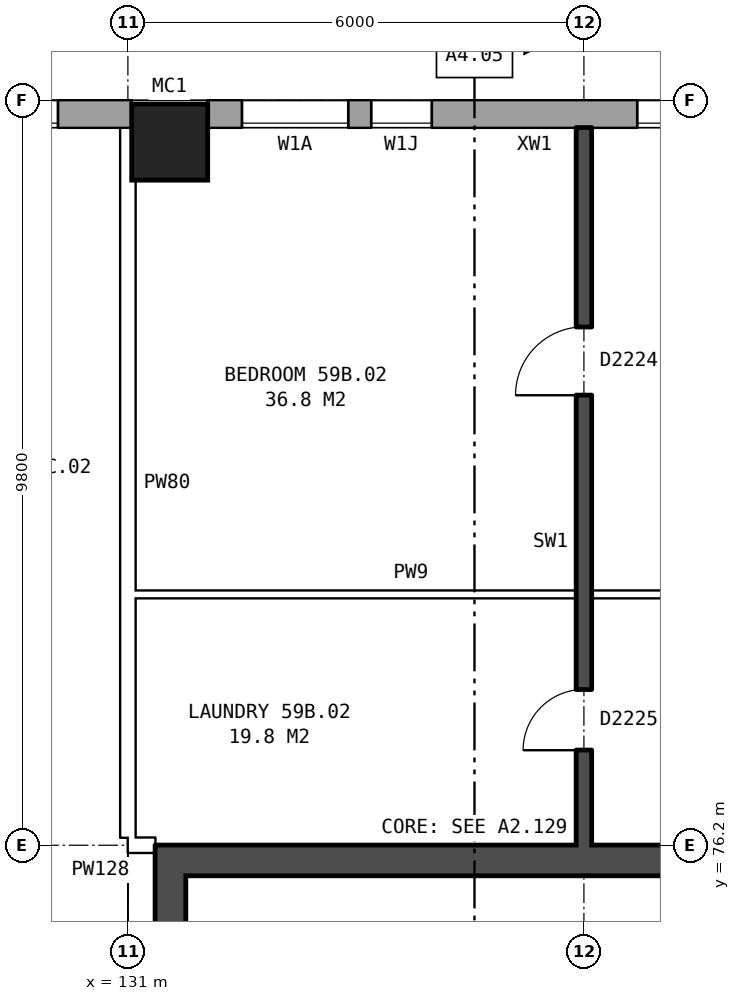
"""IFC4 building model, lengths in metres.
Left out: names, types, materials, properties, quantities, classifications, styles, units other than length and angle.
Written with IfcOpenShell. Run it as: python <this file> out.ifc"""

import sys

from ifc_helpers import new_model, si_unit, direction, frame, frame_2d, origin, origin_2d, place, context, subcontext, project, spatial, rectangle, hollow_rectangle, extrude, element, fill, save


model = new_model("IFC4")
c1 = context("Model", 3, precision=1e-05, world=origin(), true_north=direction((0.0, 1.0)))
c2 = subcontext(c1, "Body", "Model", "MODEL_VIEW")
j1 = project(units=[si_unit("LENGTHUNIT", "METRE"), si_unit("PLANEANGLEUNIT", "RADIAN")], contexts=[c1])
p1 = place(None, origin())
s1 = spatial("IfcSite", under=j1, at=p1, CompositionType="ELEMENT")
p2 = place(p1, origin())
s2 = spatial("IfcBuilding", under=s1, at=p2, CompositionType="ELEMENT")
p3 = place(p2, frame((0.0, 0.0, 209.0)))
s3 = spatial("IfcBuildingStorey", under=s2, at=p3, CompositionType="ELEMENT", Elevation=209.0)
p4 = place(p3, frame((131.55, 85.45, 0.0), z_axis=(0.0, 0.0, 1.0), x_axis=(1.0, 0.0, 0.0)))
e1 = element("IfcColumn", 1, at=p4, inside=s3, PredefinedType="COLUMN", context=c2, shape_type="SweptSolid", body=[
    extrude(hollow_rectangle(XDim=1.0, YDim=1.0, WallThickness=0.055, at=origin_2d()), origin(), (0.0, 0.0, 1.0), 3.1),
])
p5 = place(p3, frame((165.925, 85.82, 0.0), z_axis=(0.0, 0.0, 1.0), x_axis=(-1.0, 0.0, 0.0)))
e2 = element("IfcWall", 2, at=p5, inside=s3, PredefinedType="STANDARD", context=c2, shape_type="SweptSolid", body=[
    extrude(rectangle(XDim=33.875, YDim=0.36, at=frame_2d((16.938, 0.0))), origin(), (0.0, 0.0, 1.0), 2.85),
])
p6 = place(p5, frame((2.625, 0.0, 0.8)))
e3 = element("IfcOpeningElement", 3, at=p6, cuts=e2, PredefinedType="OPENING", context=c2, shape_type="SweptSolid", body=[
    extrude(rectangle(XDim=1.6, YDim=1.8, at=frame_2d((0.8, 0.9))), frame((0.0, 0.19, 0.0), z_axis=(0.0, -1.0, 0.0), x_axis=(1.0, 0.0, 0.0)), (0.0, 0.0, 1.0), 0.38),
])
p7 = place(p5, frame((5.625, 0.0, 0.8)))
e4 = element("IfcOpeningElement", 4, at=p7, cuts=e2, PredefinedType="OPENING", context=c2, shape_type="SweptSolid", body=[
    extrude(rectangle(XDim=1.6, YDim=1.8, at=frame_2d((0.8, 0.9))), frame((0.0, 0.19, 0.0), z_axis=(0.0, -1.0, 0.0), x_axis=(1.0, 0.0, 0.0)), (0.0, 0.0, 1.0), 0.38),
])
p8 = place(p5, frame((8.625, 0.0, 0.8)))
e5 = element("IfcOpeningElement", 5, at=p8, cuts=e2, PredefinedType="OPENING", context=c2, shape_type="SweptSolid", body=[
    extrude(rectangle(XDim=1.6, YDim=1.8, at=frame_2d((0.8, 0.9))), frame((0.0, 0.19, 0.0), z_axis=(0.0, -1.0, 0.0), x_axis=(1.0, 0.0, 0.0)), (0.0, 0.0, 1.0), 0.38),
])
p9 = place(p5, frame((11.625, 0.0, 0.8)))
e6 = element("IfcOpeningElement", 6, at=p9, cuts=e2, PredefinedType="OPENING", context=c2, shape_type="SweptSolid", body=[
    extrude(rectangle(XDim=1.6, YDim=1.8, at=frame_2d((0.8, 0.9))), frame((0.0, 0.19, 0.0), z_axis=(0.0, -1.0, 0.0), x_axis=(1.0, 0.0, 0.0)), (0.0, 0.0, 1.0), 0.38),
])
p10 = place(p5, frame((14.625, 0.0, 0.8)))
e7 = element("IfcOpeningElement", 7, at=p10, cuts=e2, PredefinedType="OPENING", context=c2, shape_type="SweptSolid", body=[
    extrude(rectangle(XDim=1.6, YDim=1.8, at=frame_2d((0.8, 0.9))), frame((0.0, 0.19, 0.0), z_axis=(0.0, -1.0, 0.0), x_axis=(1.0, 0.0, 0.0)), (0.0, 0.0, 1.0), 0.38),
])
p11 = place(p5, frame((17.625, 0.0, 0.8)))
e8 = element("IfcOpeningElement", 8, at=p11, cuts=e2, PredefinedType="OPENING", context=c2, shape_type="SweptSolid", body=[
    extrude(rectangle(XDim=1.6, YDim=1.8, at=frame_2d((0.8, 0.9))), frame((0.0, 0.19, 0.0), z_axis=(0.0, -1.0, 0.0), x_axis=(1.0, 0.0, 0.0)), (0.0, 0.0, 1.0), 0.38),
])
p12 = place(p5, frame((20.625, 0.0, 0.8)))
e9 = element("IfcOpeningElement", 9, at=p12, cuts=e2, PredefinedType="OPENING", context=c2, shape_type="SweptSolid", body=[
    extrude(rectangle(XDim=1.6, YDim=1.8, at=frame_2d((0.8, 0.9))), frame((0.0, 0.19, 0.0), z_axis=(0.0, -1.0, 0.0), x_axis=(1.0, 0.0, 0.0)), (0.0, 0.0, 1.0), 0.38),
])
p13 = place(p5, frame((23.625, 0.0, 0.8)))
e10 = element("IfcOpeningElement", 10, at=p13, cuts=e2, PredefinedType="OPENING", context=c2, shape_type="SweptSolid", body=[
    extrude(rectangle(XDim=1.6, YDim=1.8, at=frame_2d((0.8, 0.9))), frame((0.0, 0.19, 0.0), z_axis=(0.0, -1.0, 0.0), x_axis=(1.0, 0.0, 0.0)), (0.0, 0.0, 1.0), 0.38),
])
p14 = place(p5, frame((26.625, 0.0, 0.8)))
e11 = element("IfcOpeningElement", 11, at=p14, cuts=e2, PredefinedType="OPENING", context=c2, shape_type="SweptSolid", body=[
    extrude(rectangle(XDim=1.6, YDim=1.8, at=frame_2d((0.8, 0.9))), frame((0.0, 0.19, 0.0), z_axis=(0.0, -1.0, 0.0), x_axis=(1.0, 0.0, 0.0)), (0.0, 0.0, 1.0), 0.38),
])
p15 = place(p5, frame((30.925, 0.0, 1.1)))
e12 = element("IfcOpeningElement", 12, at=p15, cuts=e2, PredefinedType="OPENING", context=c2, shape_type="SweptSolid", body=[
    extrude(rectangle(XDim=0.8, YDim=1.5, at=frame_2d((0.4, 0.75))), frame((0.0, 0.19, 0.0), z_axis=(0.0, -1.0, 0.0), x_axis=(1.0, 0.0, 0.0)), (0.0, 0.0, 1.0), 0.38),
])
p16 = place(p5, frame((32.025, 0.0, 0.8)))
e13 = element("IfcOpeningElement", 13, at=p16, cuts=e2, PredefinedType="OPENING", context=c2, shape_type="SweptSolid", body=[
    extrude(rectangle(XDim=1.4, YDim=1.8, at=frame_2d((0.7, 0.9))), frame((0.0, 0.19, 0.0), z_axis=(0.0, -1.0, 0.0), x_axis=(1.0, 0.0, 0.0)), (0.0, 0.0, 1.0), 0.38),
])
p17 = place(p3, frame((131.05, 85.82, 0.0), z_axis=(0.0, 0.0, 1.0), x_axis=(-1.0, 0.0, 0.0)))
e14 = element("IfcWall", 14, at=p17, inside=s3, PredefinedType="STANDARD", context=c2, shape_type="SweptSolid", body=[
    extrude(rectangle(XDim=55.1, YDim=0.36, at=frame_2d((27.55, 0.0))), origin(), (0.0, 0.0, 1.0), 2.85),
])
p18 = place(p17, frame((0.969, 0.0, 0.8)))
e15 = element("IfcOpeningElement", 15, at=p18, cuts=e14, PredefinedType="OPENING", context=c2, shape_type="SweptSolid", body=[
    extrude(rectangle(XDim=1.6, YDim=1.8, at=frame_2d((0.8, 0.9))), frame((0.0, 0.19, 0.0), z_axis=(0.0, -1.0, 0.0), x_axis=(1.0, 0.0, 0.0)), (0.0, 0.0, 1.0), 0.38),
])
p19 = place(p17, frame((4.406, 0.0, 0.8)))
e16 = element("IfcOpeningElement", 16, at=p19, cuts=e14, PredefinedType="OPENING", context=c2, shape_type="SweptSolid", body=[
    extrude(rectangle(XDim=1.6, YDim=1.8, at=frame_2d((0.8, 0.9))), frame((0.0, 0.19, 0.0), z_axis=(0.0, -1.0, 0.0), x_axis=(1.0, 0.0, 0.0)), (0.0, 0.0, 1.0), 0.38),
])
p20 = place(p17, frame((7.844, 0.0, 0.8)))
e17 = element("IfcOpeningElement", 17, at=p20, cuts=e14, PredefinedType="OPENING", context=c2, shape_type="SweptSolid", body=[
    extrude(rectangle(XDim=1.6, YDim=1.8, at=frame_2d((0.8, 0.9))), frame((0.0, 0.19, 0.0), z_axis=(0.0, -1.0, 0.0), x_axis=(1.0, 0.0, 0.0)), (0.0, 0.0, 1.0), 0.38),
])
p21 = place(p17, frame((11.281, 0.0, 0.8)))
e18 = element("IfcOpeningElement", 18, at=p21, cuts=e14, PredefinedType="OPENING", context=c2, shape_type="SweptSolid", body=[
    extrude(rectangle(XDim=1.6, YDim=1.8, at=frame_2d((0.8, 0.9))), frame((0.0, 0.19, 0.0), z_axis=(0.0, -1.0, 0.0), x_axis=(1.0, 0.0, 0.0)), (0.0, 0.0, 1.0), 0.38),
])
p22 = place(p17, frame((14.719, 0.0, 0.8)))
e19 = element("IfcOpeningElement", 19, at=p22, cuts=e14, PredefinedType="OPENING", context=c2, shape_type="SweptSolid", body=[
    extrude(rectangle(XDim=1.6, YDim=1.8, at=frame_2d((0.8, 0.9))), frame((0.0, 0.19, 0.0), z_axis=(0.0, -1.0, 0.0), x_axis=(1.0, 0.0, 0.0)), (0.0, 0.0, 1.0), 0.38),
])
p23 = place(p17, frame((18.156, 0.0, 0.8)))
e20 = element("IfcOpeningElement", 20, at=p23, cuts=e14, PredefinedType="OPENING", context=c2, shape_type="SweptSolid", body=[
    extrude(rectangle(XDim=1.6, YDim=1.8, at=frame_2d((0.8, 0.9))), frame((0.0, 0.19, 0.0), z_axis=(0.0, -1.0, 0.0), x_axis=(1.0, 0.0, 0.0)), (0.0, 0.0, 1.0), 0.38),
])
p24 = place(p17, frame((21.594, 0.0, 0.8)))
e21 = element("IfcOpeningElement", 21, at=p24, cuts=e14, PredefinedType="OPENING", context=c2, shape_type="SweptSolid", body=[
    extrude(rectangle(XDim=1.6, YDim=1.8, at=frame_2d((0.8, 0.9))), frame((0.0, 0.19, 0.0), z_axis=(0.0, -1.0, 0.0), x_axis=(1.0, 0.0, 0.0)), (0.0, 0.0, 1.0), 0.38),
])
p25 = place(p17, frame((25.031, 0.0, 0.8)))
e22 = element("IfcOpeningElement", 22, at=p25, cuts=e14, PredefinedType="OPENING", context=c2, shape_type="SweptSolid", body=[
    extrude(rectangle(XDim=1.6, YDim=1.8, at=frame_2d((0.8, 0.9))), frame((0.0, 0.19, 0.0), z_axis=(0.0, -1.0, 0.0), x_axis=(1.0, 0.0, 0.0)), (0.0, 0.0, 1.0), 0.38),
])
p26 = place(p17, frame((28.469, 0.0, 0.8)))
e23 = element("IfcOpeningElement", 23, at=p26, cuts=e14, PredefinedType="OPENING", context=c2, shape_type="SweptSolid", body=[
    extrude(rectangle(XDim=1.6, YDim=1.8, at=frame_2d((0.8, 0.9))), frame((0.0, 0.19, 0.0), z_axis=(0.0, -1.0, 0.0), x_axis=(1.0, 0.0, 0.0)), (0.0, 0.0, 1.0), 0.38),
])
p27 = place(p17, frame((31.906, 0.0, 0.8)))
e24 = element("IfcOpeningElement", 24, at=p27, cuts=e14, PredefinedType="OPENING", context=c2, shape_type="SweptSolid", body=[
    extrude(rectangle(XDim=1.6, YDim=1.8, at=frame_2d((0.8, 0.9))), frame((0.0, 0.19, 0.0), z_axis=(0.0, -1.0, 0.0), x_axis=(1.0, 0.0, 0.0)), (0.0, 0.0, 1.0), 0.38),
])
p28 = place(p17, frame((35.344, 0.0, 0.8)))
e25 = element("IfcOpeningElement", 25, at=p28, cuts=e14, PredefinedType="OPENING", context=c2, shape_type="SweptSolid", body=[
    extrude(rectangle(XDim=1.6, YDim=1.8, at=frame_2d((0.8, 0.9))), frame((0.0, 0.19, 0.0), z_axis=(0.0, -1.0, 0.0), x_axis=(1.0, 0.0, 0.0)), (0.0, 0.0, 1.0), 0.38),
])
p29 = place(p17, frame((38.781, 0.0, 0.8)))
e26 = element("IfcOpeningElement", 26, at=p29, cuts=e14, PredefinedType="OPENING", context=c2, shape_type="SweptSolid", body=[
    extrude(rectangle(XDim=1.6, YDim=1.8, at=frame_2d((0.8, 0.9))), frame((0.0, 0.19, 0.0), z_axis=(0.0, -1.0, 0.0), x_axis=(1.0, 0.0, 0.0)), (0.0, 0.0, 1.0), 0.38),
])
p30 = place(p17, frame((42.219, 0.0, 0.8)))
e27 = element("IfcOpeningElement", 27, at=p30, cuts=e14, PredefinedType="OPENING", context=c2, shape_type="SweptSolid", body=[
    extrude(rectangle(XDim=1.6, YDim=1.8, at=frame_2d((0.8, 0.9))), frame((0.0, 0.19, 0.0), z_axis=(0.0, -1.0, 0.0), x_axis=(1.0, 0.0, 0.0)), (0.0, 0.0, 1.0), 0.38),
])
p31 = place(p17, frame((45.656, 0.0, 0.8)))
e28 = element("IfcOpeningElement", 28, at=p31, cuts=e14, PredefinedType="OPENING", context=c2, shape_type="SweptSolid", body=[
    extrude(rectangle(XDim=1.6, YDim=1.8, at=frame_2d((0.8, 0.9))), frame((0.0, 0.19, 0.0), z_axis=(0.0, -1.0, 0.0), x_axis=(1.0, 0.0, 0.0)), (0.0, 0.0, 1.0), 0.38),
])
p32 = place(p17, frame((49.094, 0.0, 0.8)))
e29 = element("IfcOpeningElement", 29, at=p32, cuts=e14, PredefinedType="OPENING", context=c2, shape_type="SweptSolid", body=[
    extrude(rectangle(XDim=1.6, YDim=1.8, at=frame_2d((0.8, 0.9))), frame((0.0, 0.19, 0.0), z_axis=(0.0, -1.0, 0.0), x_axis=(1.0, 0.0, 0.0)), (0.0, 0.0, 1.0), 0.38),
])
p33 = place(p17, frame((52.531, 0.0, 0.8)))
e30 = element("IfcOpeningElement", 30, at=p33, cuts=e14, PredefinedType="OPENING", context=c2, shape_type="SweptSolid", body=[
    extrude(rectangle(XDim=1.6, YDim=1.8, at=frame_2d((0.8, 0.9))), frame((0.0, 0.19, 0.0), z_axis=(0.0, -1.0, 0.0), x_axis=(1.0, 0.0, 0.0)), (0.0, 0.0, 1.0), 0.38),
])
p34 = place(p3, frame((131.56, 63.8, 0.0), z_axis=(0.0, 0.0, 1.0), x_axis=(0.0, 1.0, 0.0)))
e31 = element("IfcWall", 31, at=p34, inside=s3, PredefinedType="SHEAR", context=c2, shape_type="SweptSolid", body=[
    extrude(rectangle(XDim=12.4, YDim=0.4, at=frame_2d((6.2, 0.0))), origin(), (0.0, 0.0, 1.0), 2.85),
])
p35 = place(p34, frame((9.8, 0.0, 0.0)))
e32 = element("IfcOpeningElement", 32, at=p35, cuts=e31, PredefinedType="OPENING", context=c2, shape_type="SweptSolid", body=[
    extrude(rectangle(XDim=1.1, YDim=2.1, at=frame_2d((0.55, 1.05))), frame((0.0, 0.21, 0.0), z_axis=(0.0, -1.0, 0.0), x_axis=(1.0, 0.0, 0.0)), (0.0, 0.0, 1.0), 0.42),
])
p36 = place(p3, frame((139.36, 76.0, 0.0), z_axis=(0.0, 0.0, 1.0), x_axis=(-1.0, 0.0, 0.0)))
e33 = element("IfcWall", 33, at=p36, inside=s3, PredefinedType="SHEAR", context=c2, shape_type="SweptSolid", body=[
    extrude(rectangle(XDim=7.6, YDim=0.4, at=frame_2d((3.8, 0.0))), origin(), (0.0, 0.0, 1.0), 2.85),
])
p37 = place(p3, frame((131.0, 76.2, 0.0), z_axis=(0.0, 0.0, 1.0), x_axis=(1.0, 0.0, 0.0)))
e34 = element("IfcWall", 34, at=p37, inside=s3, PredefinedType="PARTITIONING", context=c2, shape_type="SweptSolid", body=[
    extrude(rectangle(XDim=0.36, YDim=0.2, at=frame_2d((0.18, 0.0))), origin(), (0.0, 0.0, 1.0), 2.85),
])
p38 = place(p3, frame((131.1, 79.5, 0.0), z_axis=(0.0, 0.0, 1.0), x_axis=(1.0, 0.0, 0.0)))
e35 = element("IfcWall", 35, at=p38, inside=s3, PredefinedType="PARTITIONING", context=c2, shape_type="SweptSolid", body=[
    extrude(rectangle(XDim=11.8, YDim=0.1, at=frame_2d((5.9, 0.0))), origin(), (0.0, 0.0, 1.0), 2.85),
])
p39 = place(p38, frame((7.25, 0.0, 0.0)))
e36 = element("IfcOpeningElement", 36, at=p39, cuts=e35, PredefinedType="OPENING", context=c2, shape_type="SweptSolid", body=[
    extrude(rectangle(XDim=0.9, YDim=2.1, at=frame_2d((0.45, 1.05))), frame((0.0, 0.06, 0.0), z_axis=(0.0, -1.0, 0.0), x_axis=(1.0, 0.0, 0.0)), (0.0, 0.0, 1.0), 0.12),
])
p40 = place(p38, frame((10.2, 0.0, 0.0)))
e37 = element("IfcOpeningElement", 37, at=p40, cuts=e35, PredefinedType="OPENING", context=c2, shape_type="SweptSolid", body=[
    extrude(rectangle(XDim=0.9, YDim=2.1, at=frame_2d((0.45, 1.05))), frame((0.0, 0.06, 0.0), z_axis=(0.0, -1.0, 0.0), x_axis=(1.0, 0.0, 0.0)), (0.0, 0.0, 1.0), 0.12),
])
p41 = place(p3, frame((131.0, 76.3, 0.0), z_axis=(0.0, 0.0, 1.0), x_axis=(0.0, 1.0, 0.0)))
e38 = element("IfcWall", 38, at=p41, inside=s3, PredefinedType="PARTITIONING", context=c2, shape_type="SweptSolid", body=[
    extrude(rectangle(XDim=9.34, YDim=0.2, at=frame_2d((4.67, 0.0))), origin(), (0.0, 0.0, 1.0), 2.85),
])
p42 = place(p3, frame((137.0, 76.2, 0.0), z_axis=(0.0, 0.0, 1.0), x_axis=(0.0, 1.0, 0.0)))
e39 = element("IfcWall", 39, at=p42, inside=s3, PredefinedType="SOLIDWALL", context=c2, shape_type="SweptSolid", body=[
    extrude(rectangle(XDim=9.44, YDim=0.2, at=frame_2d((4.72, 0.0))), origin(), (0.0, 0.0, 1.0), 2.85),
])
p43 = place(p42, frame((5.92, 0.0, 0.0)))
e40 = element("IfcOpeningElement", 40, at=p43, cuts=e39, PredefinedType="OPENING", context=c2, shape_type="SweptSolid", body=[
    extrude(rectangle(XDim=0.9, YDim=2.1, at=frame_2d((0.45, 1.05))), frame((0.0, 0.11, 0.0), z_axis=(0.0, -1.0, 0.0), x_axis=(1.0, 0.0, 0.0)), (0.0, 0.0, 1.0), 0.22),
])
p44 = place(p42, frame((1.25, 0.0, 0.0)))
e41 = element("IfcOpeningElement", 41, at=p44, cuts=e39, PredefinedType="OPENING", context=c2, shape_type="SweptSolid", body=[
    extrude(rectangle(XDim=0.8, YDim=2.1, at=frame_2d((0.4, 1.05))), frame((0.0, 0.11, 0.0), z_axis=(0.0, -1.0, 0.0), x_axis=(1.0, 0.0, 0.0)), (0.0, 0.0, 1.0), 0.22),
])
p45 = place(p14, origin())
e42 = element("IfcWindow", 42, at=p45, inside=s3, PartitioningType="SINGLE_PANEL", PredefinedType="WINDOW", context=c2, shape_type="SweptSolid", body=[
    extrude(rectangle(XDim=1.6, YDim=1.8, at=frame_2d((0.8, 0.9))), frame((0.0, 0.15, 0.0), z_axis=(0.0, -1.0, 0.0), x_axis=(1.0, 0.0, 0.0)), (0.0, 0.0, 1.0), 0.06),
])
fill(e11, e42)
p46 = place(p15, origin())
e43 = element("IfcWindow", 43, at=p46, inside=s3, PartitioningType="SINGLE_PANEL", PredefinedType="WINDOW", context=c2, shape_type="SweptSolid", body=[
    extrude(rectangle(XDim=0.8, YDim=1.5, at=frame_2d((0.4, 0.75))), frame((0.0, 0.15, 0.0), z_axis=(0.0, -1.0, 0.0), x_axis=(1.0, 0.0, 0.0)), (0.0, 0.0, 1.0), 0.06),
])
fill(e12, e43)
p47 = place(p18, origin())
e44 = element("IfcWindow", 44, at=p47, inside=s3, PartitioningType="SINGLE_PANEL", PredefinedType="WINDOW", context=c2, shape_type="SweptSolid", body=[
    extrude(rectangle(XDim=1.6, YDim=1.8, at=frame_2d((0.8, 0.9))), frame((0.0, 0.15, 0.0), z_axis=(0.0, -1.0, 0.0), x_axis=(1.0, 0.0, 0.0)), (0.0, 0.0, 1.0), 0.06),
])
fill(e15, e44)
p48 = place(p43, origin())
e45 = element("IfcDoor", 45, at=p48, inside=s3, OperationType="SINGLE_SWING_LEFT", PredefinedType="DOOR", context=c2, shape_type="SweptSolid", body=[
    extrude(rectangle(XDim=0.9, YDim=2.1, at=frame_2d((0.45, 1.05))), frame((0.0, 0.025, 0.0), z_axis=(0.0, -1.0, 0.0), x_axis=(1.0, 0.0, 0.0)), (0.0, 0.0, 1.0), 0.05),
])
fill(e40, e45)
p49 = place(p44, origin())
e46 = element("IfcDoor", 46, at=p49, inside=s3, OperationType="SINGLE_SWING_LEFT", PredefinedType="DOOR", context=c2, shape_type="SweptSolid", body=[
    extrude(rectangle(XDim=0.8, YDim=2.1, at=frame_2d((0.4, 1.05))), frame((0.0, 0.025, 0.0), z_axis=(0.0, -1.0, 0.0), x_axis=(1.0, 0.0, 0.0)), (0.0, 0.0, 1.0), 0.05),
])
fill(e41, e46)
p50 = place(p16, origin())
e47 = element("IfcWindow", 47, at=p50, inside=s3, PartitioningType="SINGLE_PANEL", PredefinedType="WINDOW", context=c2, shape_type="SweptSolid", body=[
    extrude(rectangle(XDim=1.4, YDim=1.8, at=frame_2d((0.7, 0.9))), frame((0.0, 0.15, 0.0), z_axis=(0.0, -1.0, 0.0), x_axis=(1.0, 0.0, 0.0)), (0.0, 0.0, 1.0), 0.06),
])
fill(e13, e47)
save(model, sys.argv[1])
